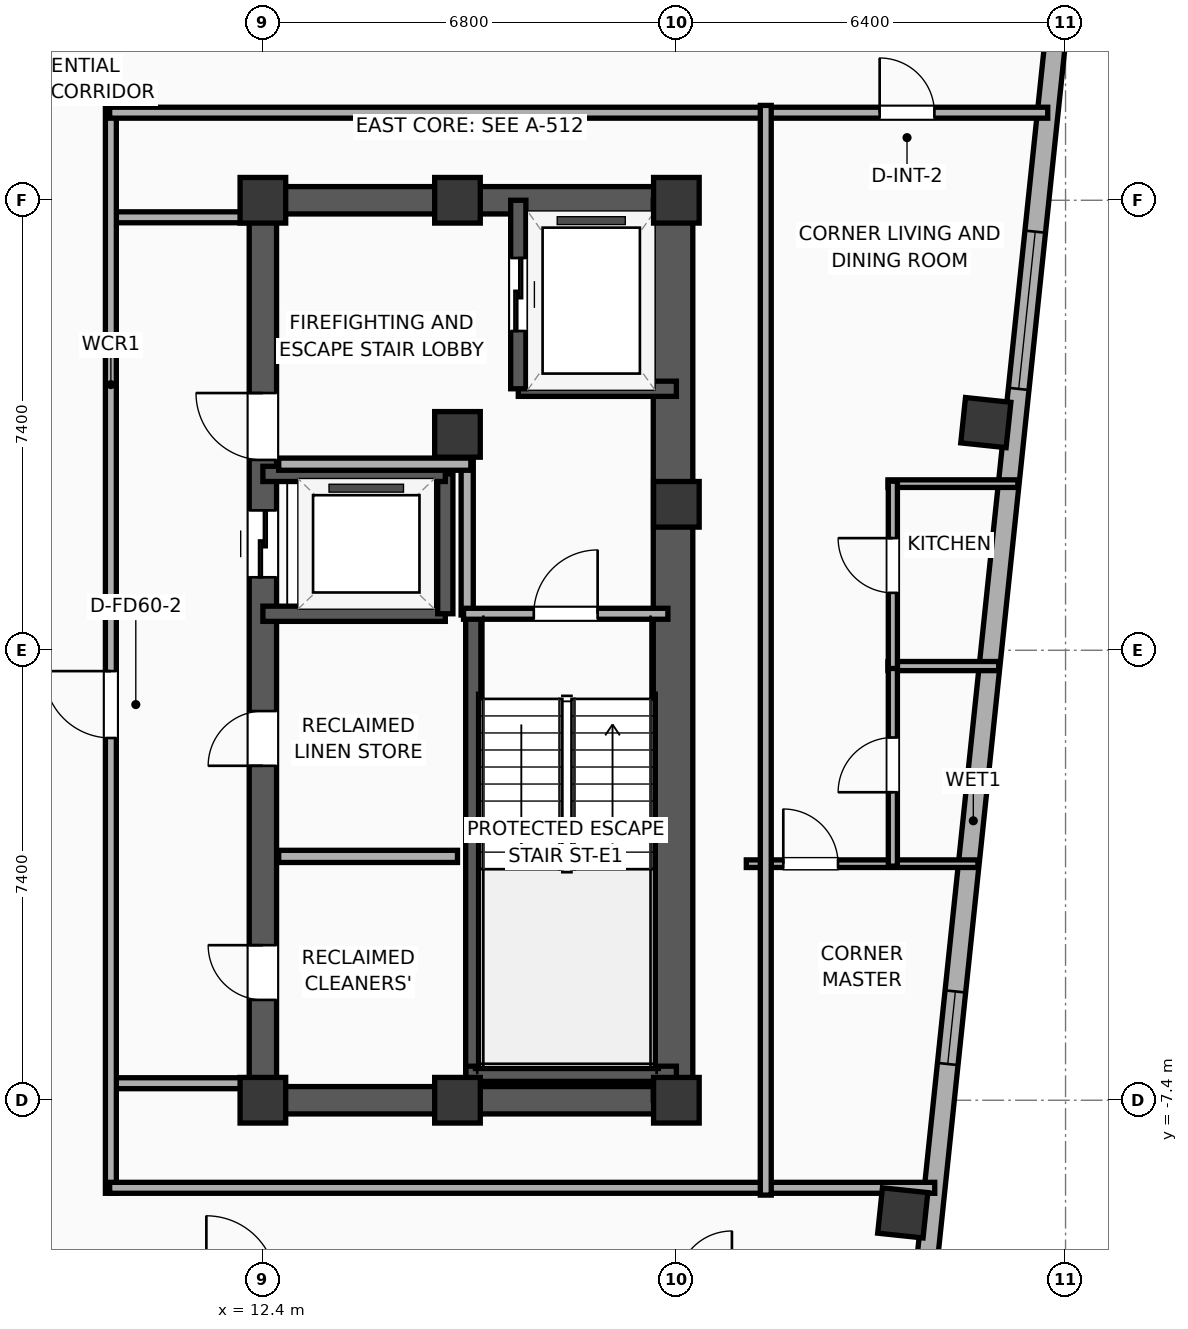
"""IFC4 building model, lengths in metres.
Left out: names, types, materials, properties, quantities, classifications, styles, units other than length and angle.
Written with IfcOpenShell. Run it as: python <this file> out.ifc"""

import sys

from ifc_helpers import new_model, si_unit, direction, frame, frame_2d, origin, origin_2d, place, context, subcontext, project, spatial, rectangle, hollow_rectangle, extrude, element, fill, save


model = new_model("IFC4")
c1 = context("Model", 3, precision=1e-05, world=origin(), true_north=direction((0.0, 1.0)))
c2 = subcontext(c1, "Body", "Model", "MODEL_VIEW")
j1 = project(units=[si_unit("LENGTHUNIT", "METRE"), si_unit("PLANEANGLEUNIT", "RADIAN")], contexts=[c1])
p1 = place(None, origin())
s1 = spatial("IfcSite", under=j1, at=p1, CompositionType="ELEMENT")
p2 = place(p1, origin())
s2 = spatial("IfcBuilding", under=s1, at=p2, CompositionType="ELEMENT")
p3 = place(p2, frame((0.0, 0.0, 302.9)))
s3 = spatial("IfcBuildingStorey", under=s2, at=p3, CompositionType="ELEMENT", Elevation=302.9)
for number, where, z_axis, x_axis in (
    (1, (12.4, -7.4, 0.0), (0.0, 0.0, 1.0), (1.0, 0.0, 0.0)),
    (2, (15.6, 3.55, 0.0), (0.0, 0.0, 1.0), (1.0, 0.0, 0.0)),
    (3, (12.4, 7.4, 0.0), (0.0, 0.0, 1.0), (1.0, 0.0, 0.0)),
    (4, (15.6, -7.4, 0.0), (0.0, 0.0, 1.0), (1.0, 0.0, 0.0)),
    (5, (15.6, 7.4, 0.0), (0.0, 0.0, 1.0), (1.0, 0.0, 0.0)),
    (6, (19.2, -7.4, 0.0), (0.0, 0.0, 1.0), (1.0, 0.0, 0.0)),
    (7, (19.2, 2.4, 0.0), (0.0, 0.0, 1.0), (1.0, 0.0, 0.0)),
    (8, (19.2, 7.4, 0.0), (0.0, 0.0, 1.0), (1.0, 0.0, 0.0)),
):
    element("IfcColumn", number, at=place(p3, frame(where, z_axis=z_axis, x_axis=x_axis)), inside=s3, PredefinedType="COLUMN", context=c2, shape_type="SweptSolid", body=[
        extrude(rectangle(XDim=0.75, YDim=0.75, at=origin_2d()), origin(), (0.0, 0.0, 1.0), 3.9),
    ])
for number, where, z_axis, x_axis in (
    (9, (12.175, -7.4, 0.0), (0.0, 0.0, 1.0), (1.0, 0.0, 0.0)),
    (10, (12.175, 7.4, 0.0), (0.0, 0.0, 1.0), (1.0, 0.0, 0.0)),
):
    element("IfcWall", number, at=place(p3, frame(where, z_axis=z_axis, x_axis=x_axis)), inside=s3, PredefinedType="SHEAR", context=c2, shape_type="SweptSolid", body=[
        extrude(rectangle(XDim=7.25, YDim=0.45, at=frame_2d((3.625, 0.0))), origin(), (0.0, 0.0, 1.0), 3.635),
    ])
p4 = place(p3, frame((12.4, -7.4, 0.0), z_axis=(0.0, 0.0, 1.0), x_axis=(0.0, 1.0, 0.0)))
e11 = element("IfcWall", 11, at=p4, inside=s3, PredefinedType="SHEAR", context=c2, shape_type="SweptSolid", body=[
    extrude(rectangle(XDim=14.8, YDim=0.45, at=frame_2d((7.4, 0.0))), origin(), (0.0, 0.0, 1.0), 3.635),
])
p5 = place(p4, frame((8.6, 0.0, 0.0)))
e12 = element("IfcOpeningElement", 12, at=p5, cuts=e11, PredefinedType="OPENING", context=c2, shape_type="SweptSolid", body=[
    extrude(rectangle(XDim=1.1, YDim=2.05, at=frame_2d((0.55, 1.025))), frame((0.0, 0.235, 0.0), z_axis=(0.0, -1.0, 0.0), x_axis=(1.0, 0.0, 0.0)), (0.0, 0.0, 1.0), 0.47),
])
p6 = place(p4, frame((10.53, 0.0, 0.0)))
e13 = element("IfcOpeningElement", 13, at=p6, cuts=e11, PredefinedType="OPENING", context=c2, shape_type="SweptSolid", body=[
    extrude(rectangle(XDim=1.1, YDim=2.05, at=frame_2d((0.55, 1.025))), frame((0.0, 0.235, 0.0), z_axis=(0.0, -1.0, 0.0), x_axis=(1.0, 0.0, 0.0)), (0.0, 0.0, 1.0), 0.47),
])
p7 = place(p4, frame((1.65, 0.0, 0.0)))
e14 = element("IfcOpeningElement", 14, at=p7, cuts=e11, PredefinedType="OPENING", context=c2, shape_type="SweptSolid", body=[
    extrude(rectangle(XDim=0.9, YDim=2.05, at=frame_2d((0.45, 1.025))), frame((0.0, 0.235, 0.0), z_axis=(0.0, -1.0, 0.0), x_axis=(1.0, 0.0, 0.0)), (0.0, 0.0, 1.0), 0.47),
])
p8 = place(p4, frame((5.5, 0.0, 0.0)))
e15 = element("IfcOpeningElement", 15, at=p8, cuts=e11, PredefinedType="OPENING", context=c2, shape_type="SweptSolid", body=[
    extrude(rectangle(XDim=0.9, YDim=2.05, at=frame_2d((0.45, 1.025))), frame((0.0, 0.235, 0.0), z_axis=(0.0, -1.0, 0.0), x_axis=(1.0, 0.0, 0.0)), (0.0, 0.0, 1.0), 0.47),
])
p9 = place(p3, frame((19.145, -7.4, 0.0), z_axis=(0.0, 0.0, 1.0), x_axis=(0.0, 1.0, 0.0)))
e16 = element("IfcWall", 16, at=p9, inside=s3, PredefinedType="SHEAR", context=c2, shape_type="SweptSolid", body=[
    extrude(rectangle(XDim=14.8, YDim=0.65, at=frame_2d((7.4, 0.0))), origin(), (0.0, 0.0, 1.0), 3.635),
])
p10 = place(p3, frame((15.86, -7.085, 0.0), z_axis=(0.0, 0.0, 1.0), x_axis=(0.0, 1.0, 0.0)))
e17 = element("IfcWall", 17, at=p10, inside=s3, PredefinedType="SOLIDWALL", context=c2, shape_type="SweptSolid", body=[
    extrude(rectangle(XDim=7.685, YDim=0.25, at=frame_2d((3.843, 0.0))), origin(), (0.0, 0.0, 1.0), 3.635),
])
p11 = place(p3, frame((15.74, -6.965, 0.0), z_axis=(0.0, 0.0, 1.0), x_axis=(1.0, 0.0, 0.0)))
e18 = element("IfcWall", 18, at=p11, inside=s3, PredefinedType="SOLIDWALL", context=c2, shape_type="SweptSolid", body=[
    extrude(rectangle(XDim=3.46, YDim=0.25, at=frame_2d((1.73, 0.0))), origin(), (0.0, 0.0, 1.0), 3.635),
])
for number, where, z_axis, x_axis in (
    (19, (22.923, -9.252, 0.0), (0.0, 0.0, 1.0), (0.995, -0.105, 0.0)),
    (20, (24.289, 3.744, 0.0), (0.0, 0.0, 1.0), (0.995, -0.105, 0.0)),
):
    element("IfcColumn", number, at=place(p3, frame(where, z_axis=z_axis, x_axis=x_axis)), inside=s3, PredefinedType="COLUMN", context=c2, shape_type="SweptSolid", body=[
        extrude(hollow_rectangle(XDim=0.75, YDim=0.75, WallThickness=0.025, at=origin_2d()), origin(), (0.0, 0.0, 1.0), 3.9),
    ])
p12 = place(p3, frame((25.67, 12.296, 0.0), z_axis=(0.0, 0.0, 1.0), x_axis=(-0.104533282919, -0.994521388791, 0.0)))
e21 = element("IfcWall", 21, at=p12, inside=s3, PredefinedType="ELEMENTEDWALL", context=c2, shape_type="SweptSolid", body=[
    extrude(rectangle(XDim=30.366, YDim=0.34, at=frame_2d((15.183, 0.0))), origin(), (0.0, 0.0, 1.0), 3.635),
])
p13 = place(p12, frame((5.442, 0.0, 0.65)))
e22 = element("IfcOpeningElement", 22, at=p13, cuts=e21, PredefinedType="OPENING", context=c2, shape_type="SweptSolid", body=[
    extrude(rectangle(XDim=2.6, YDim=2.45, at=frame_2d((1.3, 1.225))), frame((0.0, 0.18, 0.0), z_axis=(0.0, -1.0, 0.0), x_axis=(1.0, 0.0, 0.0)), (0.0, 0.0, 1.0), 0.36),
])
p14 = place(p12, frame((18.005, 0.0, 0.75)))
e23 = element("IfcOpeningElement", 23, at=p14, cuts=e21, PredefinedType="OPENING", context=c2, shape_type="SweptSolid", body=[
    extrude(rectangle(XDim=1.2, YDim=2.05, at=frame_2d((0.6, 1.025))), frame((0.0, 0.18, 0.0), z_axis=(0.0, -1.0, 0.0), x_axis=(1.0, 0.0, 0.0)), (0.0, 0.0, 1.0), 0.36),
])
p15 = place(p3, frame((16.6, 4.3, 0.0), z_axis=(0.0, 0.0, 1.0), x_axis=(1.0, 0.0, 0.0)))
e24 = element("IfcWall", 24, at=p15, inside=s3, PredefinedType="SOLIDWALL", context=c2, shape_type="SweptSolid", body=[
    extrude(rectangle(XDim=2.6, YDim=0.25, at=frame_2d((1.3, 0.0))), origin(), (0.0, 0.0, 1.0), 3.635),
])
p16 = place(p3, frame((16.6, 7.4, 0.0), z_axis=(0.0, 0.0, 1.0), x_axis=(0.0, -1.0, 0.0)))
e25 = element("IfcWall", 25, at=p16, inside=s3, PredefinedType="SOLIDWALL", context=c2, shape_type="SweptSolid", body=[
    extrude(rectangle(XDim=3.1, YDim=0.25, at=frame_2d((1.55, 0.0))), origin(), (0.0, 0.0, 1.0), 3.635),
])
p17 = place(p16, frame((0.95, 0.0, 0.0)))
e26 = element("IfcOpeningElement", 26, at=p17, cuts=e25, PredefinedType="OPENING", context=c2, shape_type="SweptSolid", body=[
    extrude(rectangle(XDim=1.2, YDim=2.05, at=frame_2d((0.6, 1.025))), frame((0.0, 0.135, 0.0), z_axis=(0.0, -1.0, 0.0), x_axis=(1.0, 0.0, 0.0)), (0.0, 0.0, 1.0), 0.27),
])
p18 = place(p3, frame((12.4, 0.6, 0.0), z_axis=(0.0, 0.0, 1.0), x_axis=(1.0, 0.0, 0.0)))
e27 = element("IfcWall", 27, at=p18, inside=s3, PredefinedType="SOLIDWALL", context=c2, shape_type="SweptSolid", body=[
    extrude(rectangle(XDim=3.0, YDim=0.25, at=frame_2d((1.5, 0.0))), origin(), (0.0, 0.0, 1.0), 3.635),
])
p19 = place(p3, frame((15.4, 0.6, 0.0), z_axis=(0.0, 0.0, 1.0), x_axis=(0.0, 1.0, 0.0)))
e28 = element("IfcWall", 28, at=p19, inside=s3, PredefinedType="SOLIDWALL", context=c2, shape_type="SweptSolid", body=[
    extrude(rectangle(XDim=2.3, YDim=0.25, at=frame_2d((1.15, 0.0))), origin(), (0.0, 0.0, 1.0), 3.635),
])
p20 = place(p3, frame((15.4, 2.9, 0.0), z_axis=(0.0, 0.0, 1.0), x_axis=(-1.0, 0.0, 0.0)))
e29 = element("IfcWall", 29, at=p20, inside=s3, PredefinedType="SOLIDWALL", context=c2, shape_type="SweptSolid", body=[
    extrude(rectangle(XDim=3.0, YDim=0.25, at=frame_2d((1.5, 0.0))), origin(), (0.0, 0.0, 1.0), 3.635),
])
p21 = place(p3, frame((15.76, 0.58, 0.0), z_axis=(0.0, 0.0, 1.0), x_axis=(0.0, 1.0, 0.0)))
e30 = element("IfcWall", 30, at=p21, inside=s3, PredefinedType="PARTITIONING", context=c2, shape_type="SweptSolid", body=[
    extrude(rectangle(XDim=2.52, YDim=0.2, at=frame_2d((1.26, 0.0))), origin(), (0.0, 0.0, 1.0), 3.635),
])
p22 = place(p3, frame((12.66, 3.06, 0.0), z_axis=(0.0, 0.0, 1.0), x_axis=(1.0, 0.0, 0.0)))
e31 = element("IfcWall", 31, at=p22, inside=s3, PredefinedType="PARTITIONING", context=c2, shape_type="SweptSolid", body=[
    extrude(rectangle(XDim=3.16, YDim=0.2, at=frame_2d((1.58, 0.0))), origin(), (0.0, 0.0, 1.0), 3.635),
])
p23 = place(p3, frame((15.7, 0.6, 0.0), z_axis=(0.0, 0.0, 1.0), x_axis=(1.0, 0.0, 0.0)))
e32 = element("IfcWall", 32, at=p23, inside=s3, PredefinedType="PARTITIONING", context=c2, shape_type="SweptSolid", body=[
    extrude(rectangle(XDim=3.36, YDim=0.18, at=frame_2d((1.68, 0.0))), origin(), (0.0, 0.0, 1.0), 3.635),
])
p24 = place(p23, frame((1.155, 0.0, 0.0)))
e33 = element("IfcOpeningElement", 33, at=p24, cuts=e32, PredefinedType="OPENING", context=c2, shape_type="SweptSolid", body=[
    extrude(rectangle(XDim=1.05, YDim=2.05, at=frame_2d((0.525, 1.025))), frame((0.0, 0.1, 0.0), z_axis=(0.0, -1.0, 0.0), x_axis=(1.0, 0.0, 0.0)), (0.0, 0.0, 1.0), 0.2),
])
p25 = place(p3, frame((12.66, -3.39, 0.0), z_axis=(0.0, 0.0, 1.0), x_axis=(1.0, 0.0, 0.0)))
e34 = element("IfcWall", 34, at=p25, inside=s3, PredefinedType="PARTITIONING", context=c2, shape_type="SweptSolid", body=[
    extrude(rectangle(XDim=2.94, YDim=0.2, at=frame_2d((1.47, 0.0))), origin(), (0.0, 0.0, 1.0), 3.635),
])
for number, where, z_axis, x_axis in (
    (35, (9.88, 7.12, 0.0), (0.0, 0.0, 1.0), (1.0, 0.0, 0.0)),
    (36, (9.88, -7.12, 0.0), (0.0, 0.0, 1.0), (1.0, 0.0, 0.0)),
):
    element("IfcWall", number, at=place(p3, frame(where, z_axis=z_axis, x_axis=x_axis)), inside=s3, PredefinedType="PARTITIONING", context=c2, shape_type="SweptSolid", body=[
        extrude(rectangle(XDim=2.27, YDim=0.18, at=frame_2d((1.135, 0.0))), origin(), (0.0, 0.0, 1.0), 3.635),
    ])
p26 = place(p3, frame((9.9, -8.93, 0.0), z_axis=(0.0, 0.0, 1.0), x_axis=(0.0, 1.0, 0.0)))
e37 = element("IfcWall", 37, at=p26, inside=s3, PredefinedType="PARTITIONING", context=c2, shape_type="SweptSolid", body=[
    extrude(rectangle(XDim=17.86, YDim=0.18, at=frame_2d((8.93, 0.0))), origin(), (0.0, 0.0, 1.0), 3.635),
])
p27 = place(p26, frame((7.487, 0.0, 0.0)))
e38 = element("IfcOpeningElement", 38, at=p27, cuts=e37, PredefinedType="OPENING", context=c2, shape_type="SweptSolid", body=[
    extrude(rectangle(XDim=1.1, YDim=2.05, at=frame_2d((0.55, 1.025))), frame((0.0, 0.1, 0.0), z_axis=(0.0, -1.0, 0.0), x_axis=(1.0, 0.0, 0.0)), (0.0, 0.0, 1.0), 0.2),
])
p28 = place(p3, frame((9.88, 8.84, 0.0), z_axis=(0.0, 0.0, 1.0), x_axis=(1.0, 0.0, 0.0)))
e39 = element("IfcWall", 39, at=p28, inside=s3, PredefinedType="PARTITIONING", context=c2, shape_type="SweptSolid", body=[
    extrude(rectangle(XDim=15.427, YDim=0.18, at=frame_2d((7.713, 0.0))), origin(), (0.0, 0.0, 1.0), 3.635),
])
p29 = place(p28, frame((12.663, 0.0, 0.0)))
e40 = element("IfcOpeningElement", 40, at=p29, cuts=e39, PredefinedType="OPENING", context=c2, shape_type="SweptSolid", body=[
    extrude(rectangle(XDim=0.9, YDim=2.05, at=frame_2d((0.45, 1.025))), frame((0.0, 0.1, 0.0), z_axis=(0.0, -1.0, 0.0), x_axis=(1.0, 0.0, 0.0)), (0.0, 0.0, 1.0), 0.2),
])
p30 = place(p3, frame((9.88, -8.84, 0.0), z_axis=(0.0, 0.0, 1.0), x_axis=(1.0, 0.0, 0.0)))
e41 = element("IfcWall", 41, at=p30, inside=s3, PredefinedType="PARTITIONING", context=c2, shape_type="SweptSolid", body=[
    extrude(rectangle(XDim=13.569, YDim=0.18, at=frame_2d((6.784, 0.0))), origin(), (0.0, 0.0, 1.0), 3.635),
])
p31 = place(p3, frame((22.68, 2.74, 0.0), z_axis=(0.0, 0.0, 1.0), x_axis=(1.0, 0.0, 0.0)))
e42 = element("IfcWall", 42, at=p31, inside=s3, PredefinedType="PARTITIONING", context=c2, shape_type="SweptSolid", body=[
    extrude(rectangle(XDim=2.137, YDim=0.125, at=frame_2d((1.068, 0.0))), origin(), (0.0, 0.0, 1.0), 3.635),
])
p32 = place(p3, frame((22.68, -0.26, 0.0), z_axis=(0.0, 0.0, 1.0), x_axis=(1.0, 0.0, 0.0)))
e43 = element("IfcWall", 43, at=p32, inside=s3, PredefinedType="PLUMBINGWALL", context=c2, shape_type="SweptSolid", body=[
    extrude(rectangle(XDim=1.821, YDim=0.15, at=frame_2d((0.911, 0.0))), origin(), (0.0, 0.0, 1.0), 3.635),
])
p33 = place(p3, frame((20.35, -3.51, 0.0), z_axis=(0.0, 0.0, 1.0), x_axis=(1.0, 0.0, 0.0)))
e44 = element("IfcWall", 44, at=p33, inside=s3, PredefinedType="PARTITIONING", context=c2, shape_type="SweptSolid", body=[
    extrude(rectangle(XDim=3.81, YDim=0.125, at=frame_2d((1.905, 0.0))), origin(), (0.0, 0.0, 1.0), 3.635),
])
p34 = place(p33, frame((0.608, 0.0, 0.0)))
e45 = element("IfcOpeningElement", 45, at=p34, cuts=e44, PredefinedType="OPENING", context=c2, shape_type="SweptSolid", body=[
    extrude(rectangle(XDim=0.9, YDim=2.05, at=frame_2d((0.45, 1.025))), frame((0.0, 0.073, 0.0), z_axis=(0.0, -1.0, 0.0), x_axis=(1.0, 0.0, 0.0)), (0.0, 0.0, 1.0), 0.145),
])
p35 = place(p3, frame((22.76, -3.55, 0.0), z_axis=(0.0, 0.0, 1.0), x_axis=(0.0, 1.0, 0.0)))
e46 = element("IfcWall", 46, at=p35, inside=s3, PredefinedType="PLUMBINGWALL", context=c2, shape_type="SweptSolid", body=[
    extrude(rectangle(XDim=3.33, YDim=0.15, at=frame_2d((1.665, 0.0))), origin(), (0.0, 0.0, 1.0), 3.635),
])
p36 = place(p35, frame((1.215, 0.0, 0.0)))
e47 = element("IfcOpeningElement", 47, at=p36, cuts=e46, PredefinedType="OPENING", context=c2, shape_type="SweptSolid", body=[
    extrude(rectangle(XDim=0.9, YDim=2.05, at=frame_2d((0.45, 1.025))), frame((0.0, 0.085, 0.0), z_axis=(0.0, -1.0, 0.0), x_axis=(1.0, 0.0, 0.0)), (0.0, 0.0, 1.0), 0.17),
])
p37 = place(p3, frame((22.76, -0.3, 0.0), z_axis=(0.0, 0.0, 1.0), x_axis=(0.0, 1.0, 0.0)))
e48 = element("IfcWall", 48, at=p37, inside=s3, PredefinedType="PLUMBINGWALL", context=c2, shape_type="SweptSolid", body=[
    extrude(rectangle(XDim=3.08, YDim=0.15, at=frame_2d((1.54, 0.0))), origin(), (0.0, 0.0, 1.0), 3.635),
])
p38 = place(p37, frame((1.244, 0.0, 0.0)))
e49 = element("IfcOpeningElement", 49, at=p38, cuts=e48, PredefinedType="OPENING", context=c2, shape_type="SweptSolid", body=[
    extrude(rectangle(XDim=0.9, YDim=2.05, at=frame_2d((0.45, 1.025))), frame((0.0, 0.085, 0.0), z_axis=(0.0, -1.0, 0.0), x_axis=(1.0, 0.0, 0.0)), (0.0, 0.0, 1.0), 0.17),
])
p39 = place(p3, frame((20.67, -8.96, 0.0), z_axis=(0.0, 0.0, 1.0), x_axis=(0.0, 1.0, 0.0)))
e50 = element("IfcWall", 50, at=p39, inside=s3, PredefinedType="PARTITIONING", context=c2, shape_type="SweptSolid", body=[
    extrude(rectangle(XDim=17.92, YDim=0.18, at=frame_2d((8.96, 0.0))), origin(), (0.0, 0.0, 1.0), 3.635),
])
p40 = place(p13, origin())
e51 = element("IfcWindow", 51, at=p40, inside=s3, PartitioningType="SINGLE_PANEL", PredefinedType="WINDOW", context=c2, shape_type="SweptSolid", body=[
    extrude(rectangle(XDim=2.6, YDim=2.45, at=frame_2d((1.3, 1.225))), frame((0.0, 0.03, 0.0), z_axis=(0.0, -1.0, 0.0), x_axis=(1.0, 0.0, 0.0)), (0.0, 0.0, 1.0), 0.06),
])
fill(e22, e51)
p41 = place(p14, origin())
e52 = element("IfcWindow", 52, at=p41, inside=s3, PartitioningType="SINGLE_PANEL", PredefinedType="WINDOW", context=c2, shape_type="SweptSolid", body=[
    extrude(rectangle(XDim=1.2, YDim=2.05, at=frame_2d((0.6, 1.025))), frame((0.0, 0.03, 0.0), z_axis=(0.0, -1.0, 0.0), x_axis=(1.0, 0.0, 0.0)), (0.0, 0.0, 1.0), 0.06),
])
fill(e23, e52)
p42 = place(p17, origin())
e53 = element("IfcDoor", 53, at=p42, inside=s3, OperationType="SLIDING_TO_LEFT", PredefinedType="DOOR", context=c2, shape_type="SweptSolid", body=[
    extrude(rectangle(XDim=1.2, YDim=2.05, at=frame_2d((0.6, 1.025))), frame((0.0, 0.025, 0.0), z_axis=(0.0, -1.0, 0.0), x_axis=(1.0, 0.0, 0.0)), (0.0, 0.0, 1.0), 0.05),
])
fill(e26, e53)
p43 = place(p5, origin())
e54 = element("IfcDoor", 54, at=p43, inside=s3, OperationType="SLIDING_TO_LEFT", PredefinedType="DOOR", context=c2, shape_type="SweptSolid", body=[
    extrude(rectangle(XDim=1.1, YDim=2.05, at=frame_2d((0.55, 1.025))), frame((0.0, 0.025, 0.0), z_axis=(0.0, -1.0, 0.0), x_axis=(1.0, 0.0, 0.0)), (0.0, 0.0, 1.0), 0.05),
])
fill(e12, e54)
p44 = place(p24, origin())
e55 = element("IfcDoor", 55, at=p44, inside=s3, OperationType="SINGLE_SWING_RIGHT", PredefinedType="DOOR", context=c2, shape_type="SweptSolid", body=[
    extrude(rectangle(XDim=1.05, YDim=2.05, at=frame_2d((0.525, 1.025))), frame((0.0, 0.025, 0.0), z_axis=(0.0, -1.0, 0.0), x_axis=(1.0, 0.0, 0.0)), (0.0, 0.0, 1.0), 0.05),
])
fill(e33, e55)
p45 = place(p27, origin())
e56 = element("IfcDoor", 56, at=p45, inside=s3, OperationType="SINGLE_SWING_RIGHT", PredefinedType="DOOR", context=c2, shape_type="SweptSolid", body=[
    extrude(rectangle(XDim=1.1, YDim=2.05, at=frame_2d((0.55, 1.025))), frame((0.0, 0.025, 0.0), z_axis=(0.0, -1.0, 0.0), x_axis=(1.0, 0.0, 0.0)), (0.0, 0.0, 1.0), 0.05),
])
fill(e38, e56)
p46 = place(p29, origin())
e57 = element("IfcDoor", 57, at=p46, inside=s3, OperationType="SINGLE_SWING_LEFT", PredefinedType="DOOR", context=c2, shape_type="SweptSolid", body=[
    extrude(rectangle(XDim=0.9, YDim=2.05, at=frame_2d((0.45, 1.025))), frame((0.0, 0.025, 0.0), z_axis=(0.0, -1.0, 0.0), x_axis=(1.0, 0.0, 0.0)), (0.0, 0.0, 1.0), 0.05),
])
fill(e40, e57)
p47 = place(p34, origin())
e58 = element("IfcDoor", 58, at=p47, inside=s3, OperationType="SINGLE_SWING_LEFT", PredefinedType="DOOR", context=c2, shape_type="SweptSolid", body=[
    extrude(rectangle(XDim=0.9, YDim=2.05, at=frame_2d((0.45, 1.025))), frame((0.0, 0.025, 0.0), z_axis=(0.0, -1.0, 0.0), x_axis=(1.0, 0.0, 0.0)), (0.0, 0.0, 1.0), 0.05),
])
fill(e45, e58)
p48 = place(p36, origin())
e59 = element("IfcDoor", 59, at=p48, inside=s3, OperationType="SINGLE_SWING_LEFT", PredefinedType="DOOR", context=c2, shape_type="SweptSolid", body=[
    extrude(rectangle(XDim=0.9, YDim=2.05, at=frame_2d((0.45, 1.025))), frame((0.0, 0.025, 0.0), z_axis=(0.0, -1.0, 0.0), x_axis=(1.0, 0.0, 0.0)), (0.0, 0.0, 1.0), 0.05),
])
fill(e47, e59)
p49 = place(p38, origin())
e60 = element("IfcDoor", 60, at=p49, inside=s3, OperationType="SINGLE_SWING_RIGHT", PredefinedType="DOOR", context=c2, shape_type="SweptSolid", body=[
    extrude(rectangle(XDim=0.9, YDim=2.05, at=frame_2d((0.45, 1.025))), frame((0.0, 0.025, 0.0), z_axis=(0.0, -1.0, 0.0), x_axis=(1.0, 0.0, 0.0)), (0.0, 0.0, 1.0), 0.05),
])
fill(e49, e60)
p50 = place(p6, origin())
e61 = element("IfcDoor", 61, at=p50, inside=s3, OperationType="SINGLE_SWING_RIGHT", PredefinedType="DOOR", context=c2, shape_type="SweptSolid", body=[
    extrude(rectangle(XDim=1.1, YDim=2.05, at=frame_2d((0.55, 1.025))), frame((0.0, 0.025, 0.0), z_axis=(0.0, -1.0, 0.0), x_axis=(1.0, 0.0, 0.0)), (0.0, 0.0, 1.0), 0.05),
])
fill(e13, e61)
p51 = place(p7, origin())
e62 = element("IfcDoor", 62, at=p51, inside=s3, OperationType="SINGLE_SWING_RIGHT", PredefinedType="DOOR", context=c2, shape_type="SweptSolid", body=[
    extrude(rectangle(XDim=0.9, YDim=2.05, at=frame_2d((0.45, 1.025))), frame((0.0, 0.025, 0.0), z_axis=(0.0, -1.0, 0.0), x_axis=(1.0, 0.0, 0.0)), (0.0, 0.0, 1.0), 0.05),
])
fill(e14, e62)
p52 = place(p8, origin())
e63 = element("IfcDoor", 63, at=p52, inside=s3, OperationType="SINGLE_SWING_LEFT", PredefinedType="DOOR", context=c2, shape_type="SweptSolid", body=[
    extrude(rectangle(XDim=0.9, YDim=2.05, at=frame_2d((0.45, 1.025))), frame((0.0, 0.025, 0.0), z_axis=(0.0, -1.0, 0.0), x_axis=(1.0, 0.0, 0.0)), (0.0, 0.0, 1.0), 0.05),
])
fill(e15, e63)
save(model, sys.argv[1])
